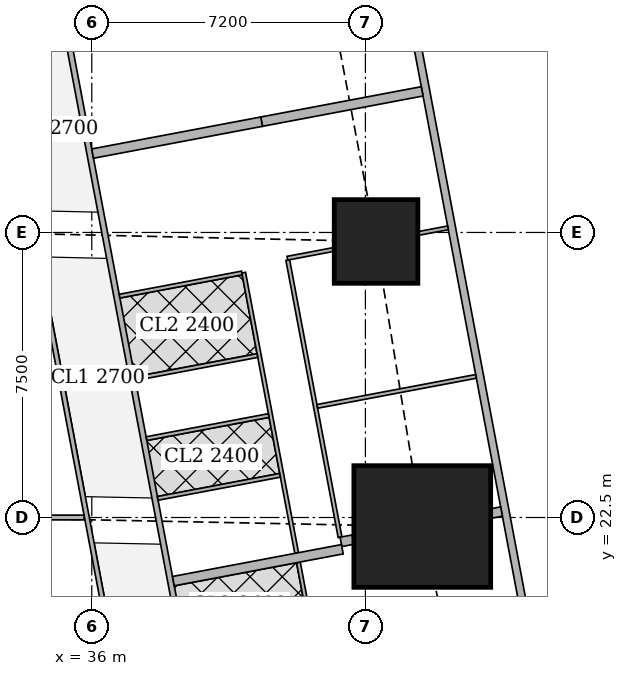
"""IFC4 building model, lengths in metres.
Left out: names, types, materials, properties, quantities, classifications, styles, units other than length and angle.
Written with IfcOpenShell. Run it as: python <this file> out.ifc"""

import sys

from ifc_helpers import new_model, si_unit, direction, frame, frame_2d, origin, origin_2d, place, context, subcontext, project, spatial, rectangle, extrude, element, fill, save


model = new_model("IFC4")
c1 = context("Model", 3, precision=1e-05, world=origin(), true_north=direction((0.0, 1.0)))
c2 = subcontext(c1, "Body", "Model", "MODEL_VIEW")
j1 = project(units=[si_unit("LENGTHUNIT", "METRE"), si_unit("PLANEANGLEUNIT", "RADIAN")], contexts=[c1])
p1 = place(None, origin())
s1 = spatial("IfcSite", under=j1, at=p1, CompositionType="ELEMENT")
p2 = place(p1, origin())
s2 = spatial("IfcBuilding", under=s1, at=p2, CompositionType="ELEMENT")
p3 = place(p2, frame((0.0, 0.0, 100.4)))
s3 = spatial("IfcBuildingStorey", under=s2, at=p3, CompositionType="ELEMENT", Elevation=100.4)
p4 = place(p3, frame((44.697, 22.263, 0.0), z_axis=(0.0, 0.0, 1.0), x_axis=(1.0, 0.0, 0.0)))
e1 = element("IfcColumn", 1, at=p4, inside=s3, PredefinedType="COLUMN", context=c2, shape_type="SweptSolid", body=[
    extrude(rectangle(XDim=3.6, YDim=3.2, at=origin_2d()), origin(), (0.0, 0.0, 1.0), 3.75),
])
p5 = place(p3, frame((43.48, 29.763, 0.0), z_axis=(0.0, 0.0, 1.0), x_axis=(1.0, 0.0, 0.0)))
e2 = element("IfcColumn", 2, at=p5, inside=s3, PredefinedType="COLUMN", context=c2, shape_type="SweptSolid", body=[
    extrude(rectangle(XDim=2.2, YDim=2.2, at=origin_2d()), origin(), (0.0, 0.0, 1.0), 3.75),
])
p6 = place(p3, frame((50.653, 2.703, 0.0), z_axis=(0.0, 0.0, 1.0), x_axis=(-0.185612026696, 0.982623109613, 0.0)))
e3 = element("IfcWall", 3, at=p6, inside=s3, PredefinedType="SOLIDWALL", context=c2, shape_type="SweptSolid", body=[
    extrude(rectangle(XDim=41.393, YDim=0.2, at=frame_2d((20.697, 0.0))), origin(), (0.0, 0.0, 1.0), 3.5),
])
p7 = place(p6, frame((1.633, 0.0, 0.9)))
e4 = element("IfcOpeningElement", 4, at=p7, cuts=e3, PredefinedType="OPENING", context=c2, shape_type="SweptSolid", body=[
    extrude(rectangle(XDim=1.8, YDim=1.5, at=frame_2d((0.9, 0.75))), frame((0.0, 0.11, 0.0), z_axis=(0.0, -1.0, 0.0), x_axis=(1.0, 0.0, 0.0)), (0.0, 0.0, 1.0), 0.22),
])
p8 = place(p6, frame((6.032, 0.0, 0.9)))
e5 = element("IfcOpeningElement", 5, at=p8, cuts=e3, PredefinedType="OPENING", context=c2, shape_type="SweptSolid", body=[
    extrude(rectangle(XDim=1.8, YDim=1.5, at=frame_2d((0.9, 0.75))), frame((0.0, 0.11, 0.0), z_axis=(0.0, -1.0, 0.0), x_axis=(1.0, 0.0, 0.0)), (0.0, 0.0, 1.0), 0.22),
])
p9 = place(p6, frame((9.848, 0.0, 0.9)))
e6 = element("IfcOpeningElement", 6, at=p9, cuts=e3, PredefinedType="OPENING", context=c2, shape_type="SweptSolid", body=[
    extrude(rectangle(XDim=1.8, YDim=1.5, at=frame_2d((0.9, 0.75))), frame((0.0, 0.11, 0.0), z_axis=(0.0, -1.0, 0.0), x_axis=(1.0, 0.0, 0.0)), (0.0, 0.0, 1.0), 0.22),
])
p10 = place(p6, frame((13.664, 0.0, 0.9)))
e7 = element("IfcOpeningElement", 7, at=p10, cuts=e3, PredefinedType="OPENING", context=c2, shape_type="SweptSolid", body=[
    extrude(rectangle(XDim=1.8, YDim=1.5, at=frame_2d((0.9, 0.75))), frame((0.0, 0.11, 0.0), z_axis=(0.0, -1.0, 0.0), x_axis=(1.0, 0.0, 0.0)), (0.0, 0.0, 1.0), 0.22),
])
p11 = place(p6, frame((17.481, 0.0, 0.9)))
e8 = element("IfcOpeningElement", 8, at=p11, cuts=e3, PredefinedType="OPENING", context=c2, shape_type="SweptSolid", body=[
    extrude(rectangle(XDim=1.8, YDim=1.5, at=frame_2d((0.9, 0.75))), frame((0.0, 0.11, 0.0), z_axis=(0.0, -1.0, 0.0), x_axis=(1.0, 0.0, 0.0)), (0.0, 0.0, 1.0), 0.22),
])
p12 = place(p6, frame((21.297, 0.0, 0.9)))
e9 = element("IfcOpeningElement", 9, at=p12, cuts=e3, PredefinedType="OPENING", context=c2, shape_type="SweptSolid", body=[
    extrude(rectangle(XDim=1.8, YDim=1.5, at=frame_2d((0.9, 0.75))), frame((0.0, 0.11, 0.0), z_axis=(0.0, -1.0, 0.0), x_axis=(1.0, 0.0, 0.0)), (0.0, 0.0, 1.0), 0.22),
])
p13 = place(p6, frame((25.113, 0.0, 0.9)))
e10 = element("IfcOpeningElement", 10, at=p13, cuts=e3, PredefinedType="OPENING", context=c2, shape_type="SweptSolid", body=[
    extrude(rectangle(XDim=1.8, YDim=1.5, at=frame_2d((0.9, 0.75))), frame((0.0, 0.11, 0.0), z_axis=(0.0, -1.0, 0.0), x_axis=(1.0, 0.0, 0.0)), (0.0, 0.0, 1.0), 0.22),
])
p14 = place(p6, frame((28.93, 0.0, 0.9)))
e11 = element("IfcOpeningElement", 11, at=p14, cuts=e3, PredefinedType="OPENING", context=c2, shape_type="SweptSolid", body=[
    extrude(rectangle(XDim=1.8, YDim=1.5, at=frame_2d((0.9, 0.75))), frame((0.0, 0.11, 0.0), z_axis=(0.0, -1.0, 0.0), x_axis=(1.0, 0.0, 0.0)), (0.0, 0.0, 1.0), 0.22),
])
p15 = place(p6, frame((32.746, 0.0, 0.9)))
e12 = element("IfcOpeningElement", 12, at=p15, cuts=e3, PredefinedType="OPENING", context=c2, shape_type="SweptSolid", body=[
    extrude(rectangle(XDim=1.8, YDim=1.5, at=frame_2d((0.9, 0.75))), frame((0.0, 0.11, 0.0), z_axis=(0.0, -1.0, 0.0), x_axis=(1.0, 0.0, 0.0)), (0.0, 0.0, 1.0), 0.22),
])
p16 = place(p6, frame((36.481, 0.0, 0.9)))
e13 = element("IfcOpeningElement", 13, at=p16, cuts=e3, PredefinedType="OPENING", context=c2, shape_type="SweptSolid", body=[
    extrude(rectangle(XDim=1.8, YDim=1.5, at=frame_2d((0.9, 0.75))), frame((0.0, 0.11, 0.0), z_axis=(0.0, -1.0, 0.0), x_axis=(1.0, 0.0, 0.0)), (0.0, 0.0, 1.0), 0.22),
])
p17 = place(p3, frame((33.382, 45.65, 0.0), z_axis=(0.0, 0.0, 1.0), x_axis=(0.185593544777, -0.982626600565, 0.0)))
e14 = element("IfcWall", 14, at=p17, inside=s3, PredefinedType="SOLIDWALL", context=c2, shape_type="SweptSolid", body=[
    extrude(rectangle(XDim=47.118, YDim=0.15, at=frame_2d((23.559, 0.0))), origin(), (0.0, 0.0, 1.0), 2.2),
])
p18 = place(p17, frame((10.662, 0.0, 0.0)))
e15 = element("IfcOpeningElement", 15, at=p18, cuts=e14, PredefinedType="OPENING", context=c2, shape_type="SweptSolid", body=[
    extrude(rectangle(XDim=1.0, YDim=2.1, at=frame_2d((0.5, 1.05))), frame((0.0, 0.085, 0.0), z_axis=(0.0, -1.0, 0.0), x_axis=(1.0, 0.0, 0.0)), (0.0, 0.0, 1.0), 0.17),
])
p19 = place(p17, frame((15.237, 0.0, 0.0)))
e16 = element("IfcOpeningElement", 16, at=p19, cuts=e14, PredefinedType="OPENING", context=c2, shape_type="SweptSolid", body=[
    extrude(rectangle(XDim=1.0, YDim=2.1, at=frame_2d((0.5, 1.05))), frame((0.0, 0.085, 0.0), z_axis=(0.0, -1.0, 0.0), x_axis=(1.0, 0.0, 0.0)), (0.0, 0.0, 1.0), 0.17),
])
p20 = place(p17, frame((27.341, 0.0, 0.0)))
e17 = element("IfcOpeningElement", 17, at=p20, cuts=e14, PredefinedType="OPENING", context=c2, shape_type="SweptSolid", body=[
    extrude(rectangle(XDim=1.0, YDim=2.1, at=frame_2d((0.5, 1.05))), frame((0.0, 0.085, 0.0), z_axis=(0.0, -1.0, 0.0), x_axis=(1.0, 0.0, 0.0)), (0.0, 0.0, 1.0), 0.17),
])
p21 = place(p17, frame((33.833, 0.0, 0.0)))
e18 = element("IfcOpeningElement", 18, at=p21, cuts=e14, PredefinedType="OPENING", context=c2, shape_type="SweptSolid", body=[
    extrude(rectangle(XDim=1.0, YDim=2.1, at=frame_2d((0.5, 1.05))), frame((0.0, 0.085, 0.0), z_axis=(0.0, -1.0, 0.0), x_axis=(1.0, 0.0, 0.0)), (0.0, 0.0, 1.0), 0.17),
])
p22 = place(p3, frame((41.157, 29.273, 0.0), z_axis=(0.0, 0.0, 1.0), x_axis=(0.18542464283, -0.982658486877, 0.0)))
e19 = element("IfcWall", 19, at=p22, inside=s3, PredefinedType="PARTITIONING", context=c2, shape_type="SweptSolid", body=[
    extrude(rectangle(XDim=7.421, YDim=0.1, at=frame_2d((3.71, 0.0))), origin(), (0.0, 0.0, 1.0), 2.5),
])
p23 = place(p22, frame((0.9, 0.0, 0.0)))
e20 = element("IfcOpeningElement", 20, at=p23, cuts=e19, PredefinedType="OPENING", context=c2, shape_type="SweptSolid", body=[
    extrude(rectangle(XDim=0.9, YDim=2.1, at=frame_2d((0.45, 1.05))), frame((0.0, 0.06, 0.0), z_axis=(0.0, -1.0, 0.0), x_axis=(1.0, 0.0, 0.0)), (0.0, 0.0, 1.0), 0.12),
])
p24 = place(p22, frame((4.126, 0.0, 0.0)))
e21 = element("IfcOpeningElement", 21, at=p24, cuts=e19, PredefinedType="OPENING", context=c2, shape_type="SweptSolid", body=[
    extrude(rectangle(XDim=0.9, YDim=2.1, at=frame_2d((0.45, 1.05))), frame((0.0, 0.06, 0.0), z_axis=(0.0, -1.0, 0.0), x_axis=(1.0, 0.0, 0.0)), (0.0, 0.0, 1.0), 0.12),
])
p25 = place(p3, frame((39.997, 28.942, 0.0), z_axis=(0.0, 0.0, 1.0), x_axis=(0.185686318797, -0.982609073341, 0.0)))
e22 = element("IfcWall", 22, at=p25, inside=s3, PredefinedType="PARTITIONING", context=c2, shape_type="SweptSolid", body=[
    extrude(rectangle(XDim=7.508, YDim=0.1, at=frame_2d((3.754, 0.0))), origin(), (0.0, 0.0, 1.0), 2.5),
])
p26 = place(p25, frame((0.655, 0.0, 0.0)))
e23 = element("IfcOpeningElement", 23, at=p26, cuts=e22, PredefinedType="OPENING", context=c2, shape_type="SweptSolid", body=[
    extrude(rectangle(XDim=0.9, YDim=2.1, at=frame_2d((0.45, 1.05))), frame((0.0, 0.06, 0.0), z_axis=(0.0, -1.0, 0.0), x_axis=(1.0, 0.0, 0.0)), (0.0, 0.0, 1.0), 0.12),
])
p27 = place(p25, frame((4.166, 0.0, 0.0)))
e24 = element("IfcOpeningElement", 24, at=p27, cuts=e22, PredefinedType="OPENING", context=c2, shape_type="SweptSolid", body=[
    extrude(rectangle(XDim=0.9, YDim=2.1, at=frame_2d((0.45, 1.05))), frame((0.0, 0.06, 0.0), z_axis=(0.0, -1.0, 0.0), x_axis=(1.0, 0.0, 0.0)), (0.0, 0.0, 1.0), 0.12),
])
p28 = place(p25, frame((2.563, 0.0, 0.0)))
e25 = element("IfcOpeningElement", 25, at=p28, cuts=e22, PredefinedType="OPENING", context=c2, shape_type="SweptSolid", body=[
    extrude(rectangle(XDim=0.9, YDim=2.1, at=frame_2d((0.45, 1.05))), frame((0.0, 0.06, 0.0), z_axis=(0.0, -1.0, 0.0), x_axis=(1.0, 0.0, 0.0)), (0.0, 0.0, 1.0), 0.12),
])
p29 = place(p25, frame((6.074, 0.0, 0.0)))
e26 = element("IfcOpeningElement", 26, at=p29, cuts=e22, PredefinedType="OPENING", context=c2, shape_type="SweptSolid", body=[
    extrude(rectangle(XDim=0.9, YDim=2.1, at=frame_2d((0.45, 1.05))), frame((0.0, 0.06, 0.0), z_axis=(0.0, -1.0, 0.0), x_axis=(1.0, 0.0, 0.0)), (0.0, 0.0, 1.0), 0.12),
])
p30 = place(p3, frame((45.372, 30.121, 0.0), z_axis=(0.0, 0.0, 1.0), x_axis=(-0.982512656401, -0.186195810938, 0.0)))
e27 = element("IfcWall", 27, at=p30, inside=s3, PredefinedType="PARTITIONING", context=c2, shape_type="SweptSolid", body=[
    extrude(rectangle(XDim=0.796, YDim=0.1, at=frame_2d((0.398, 0.0))), origin(), (0.0, 0.0, 1.0), 3.5),
])
p31 = place(p3, frame((42.37, 29.553, 0.0), z_axis=(0.0, 0.0, 1.0), x_axis=(-0.98263602344, -0.185543648338, 0.0)))
e28 = element("IfcWall", 28, at=p31, inside=s3, PredefinedType="PARTITIONING", context=c2, shape_type="SweptSolid", body=[
    extrude(rectangle(XDim=1.245, YDim=0.1, at=frame_2d((0.623, 0.0))), origin(), (0.0, 0.0, 1.0), 2.5),
])
p32 = place(p3, frame((46.11, 26.213, 0.0), z_axis=(0.0, 0.0, 1.0), x_axis=(-0.982623519589, -0.185609856287, 0.0)))
e29 = element("IfcWall", 29, at=p32, inside=s3, PredefinedType="PARTITIONING", context=c2, shape_type="SweptSolid", body=[
    extrude(rectangle(XDim=4.25, YDim=0.1, at=frame_2d((2.125, 0.0))), origin(), (0.0, 0.0, 1.0), 2.2),
])
p33 = place(p3, frame((39.948, 28.933, 0.0), z_axis=(0.0, 0.0, 1.0), x_axis=(-0.982542259571, -0.186039533857, 0.0)))
e30 = element("IfcWall", 30, at=p33, inside=s3, PredefinedType="PARTITIONING", context=c2, shape_type="SweptSolid", body=[
    extrude(rectangle(XDim=3.274, YDim=0.1, at=frame_2d((1.637, 0.0))), origin(), (0.0, 0.0, 1.0), 3.5),
])
p34 = place(p3, frame((40.656, 25.183, 0.0), z_axis=(0.0, 0.0, 1.0), x_axis=(-0.982596739811, -0.18575157311, 0.0)))
e31 = element("IfcWall", 31, at=p34, inside=s3, PredefinedType="PARTITIONING", context=c2, shape_type="SweptSolid", body=[
    extrude(rectangle(XDim=3.274, YDim=0.1, at=frame_2d((1.637, 0.0))), origin(), (0.0, 0.0, 1.0), 3.5),
])
p35 = place(p3, frame((40.358, 26.761, 0.0), z_axis=(0.0, 0.0, 1.0), x_axis=(-0.982607776398, -0.185693181787, 0.0)))
e32 = element("IfcWall", 32, at=p35, inside=s3, PredefinedType="PARTITIONING", context=c2, shape_type="SweptSolid", body=[
    extrude(rectangle(XDim=3.274, YDim=0.1, at=frame_2d((1.637, 0.0))), origin(), (0.0, 0.0, 1.0), 3.5),
])
p36 = place(p3, frame((40.954, 23.61, 0.0), z_axis=(0.0, 0.0, 1.0), x_axis=(-0.982661397469, -0.185409217473, 0.0)))
e33 = element("IfcWall", 33, at=p36, inside=s3, PredefinedType="PARTITIONING", context=c2, shape_type="SweptSolid", body=[
    extrude(rectangle(XDim=3.275, YDim=0.1, at=frame_2d((1.637, 0.0))), origin(), (0.0, 0.0, 1.0), 2.5),
])
p37 = place(p3, frame((44.693, 33.713, 0.0), z_axis=(0.0, 0.0, 1.0), x_axis=(-0.982633535512, -0.185556823879, 0.0)))
e34 = element("IfcWall", 34, at=p37, inside=s3, PredefinedType="SOLIDWALL", context=c2, shape_type="SweptSolid", body=[
    extrude(rectangle(XDim=4.3, YDim=0.25, at=frame_2d((2.15, 0.0))), origin(), (0.0, 0.0, 1.0), 2.2),
])
p38 = place(p3, frame((40.468, 32.915, 0.0), z_axis=(0.0, 0.0, 1.0), x_axis=(-0.982612837616, -0.185666398014, 0.0)))
e35 = element("IfcWall", 35, at=p38, inside=s3, PredefinedType="SOLIDWALL", context=c2, shape_type="SweptSolid", body=[
    extrude(rectangle(XDim=4.525, YDim=0.25, at=frame_2d((2.262, 0.0))), origin(), (0.0, 0.0, 1.0), 3.5),
])
p39 = place(p3, frame((41.437, 21.319, 0.0), z_axis=(0.0, 0.0, 1.0), x_axis=(0.185793689589, -0.982588777113, 0.0)))
e36 = element("IfcWall", 36, at=p39, inside=s3, PredefinedType="PARTITIONING", context=c2, shape_type="SweptSolid", body=[
    extrude(rectangle(XDim=1.625, YDim=0.1, at=frame_2d((0.813, 0.0))), origin(), (0.0, 0.0, 1.0), 3.5),
])
p40 = place(p39, frame((0.325, 0.0, 0.0)))
e37 = element("IfcOpeningElement", 37, at=p40, cuts=e36, PredefinedType="OPENING", context=c2, shape_type="SweptSolid", body=[
    extrude(rectangle(XDim=0.9, YDim=2.1, at=frame_2d((0.45, 1.05))), frame((0.0, 0.06, 0.0), z_axis=(0.0, -1.0, 0.0), x_axis=(1.0, 0.0, 0.0)), (0.0, 0.0, 1.0), 0.12),
])
p41 = place(p3, frame((46.782, 22.657, 0.0), z_axis=(0.0, 0.0, 1.0), x_axis=(-0.982104607121, -0.188336243648, 0.0)))
e38 = element("IfcWall", 38, at=p41, inside=s3, PredefinedType="SOLIDWALL", context=c2, shape_type="SweptSolid", body=[
    extrude(rectangle(XDim=0.266, YDim=0.25, at=frame_2d((0.133, 0.0))), origin(), (0.0, 0.0, 1.0), 3.5),
])
p42 = place(p3, frame((42.873, 21.918, 0.0), z_axis=(0.0, 0.0, 1.0), x_axis=(-0.982431406936, -0.186624035603, 0.0)))
e39 = element("IfcWall", 39, at=p42, inside=s3, PredefinedType="SOLIDWALL", context=c2, shape_type="SweptSolid", body=[
    extrude(rectangle(XDim=0.322, YDim=0.25, at=frame_2d((0.161, 0.0))), origin(), (0.0, 0.0, 1.0), 2.5),
])
p43 = place(p3, frame((42.593, 21.665, 0.0), z_axis=(0.0, 0.0, 1.0), x_axis=(-0.982612837616, -0.185666398014, 0.0)))
e40 = element("IfcWall", 40, at=p43, inside=s3, PredefinedType="SOLIDWALL", context=c2, shape_type="SweptSolid", body=[
    extrude(rectangle(XDim=4.525, YDim=0.25, at=frame_2d((2.262, 0.0))), origin(), (0.0, 0.0, 1.0), 2.5),
])
p44 = place(p3, frame((38.202, 10.163, 0.0), z_axis=(0.0, 0.0, 1.0), x_axis=(-0.185610321132, 0.982623431783, 0.0)))
e41 = element("IfcWall", 41, at=p44, inside=s3, PredefinedType="PARTITIONING", context=c2, shape_type="SweptSolid", body=[
    extrude(rectangle(XDim=25.111, YDim=0.125, at=frame_2d((12.556, 0.0))), origin(), (0.0, 0.0, 1.0), 2.5),
])
p45 = place(p44, frame((0.708, 0.0, 0.0)))
e42 = element("IfcOpeningElement", 42, at=p45, cuts=e41, PredefinedType="OPENING", context=c2, shape_type="SweptSolid", body=[
    extrude(rectangle(XDim=1.0, YDim=2.1, at=frame_2d((0.5, 1.05))), frame((0.0, 0.073, 0.0), z_axis=(0.0, -1.0, 0.0), x_axis=(1.0, 0.0, 0.0)), (0.0, 0.0, 1.0), 0.145),
])
p46 = place(p44, frame((6.0, 0.0, 0.0)))
e43 = element("IfcOpeningElement", 43, at=p46, cuts=e41, PredefinedType="OPENING", context=c2, shape_type="SweptSolid", body=[
    extrude(rectangle(XDim=1.0, YDim=2.1, at=frame_2d((0.5, 1.05))), frame((0.0, 0.073, 0.0), z_axis=(0.0, -1.0, 0.0), x_axis=(1.0, 0.0, 0.0)), (0.0, 0.0, 1.0), 0.145),
])
p47 = place(p44, frame((13.378, 0.0, 0.0)))
e44 = element("IfcOpeningElement", 44, at=p47, cuts=e41, PredefinedType="OPENING", context=c2, shape_type="SweptSolid", body=[
    extrude(rectangle(XDim=1.0, YDim=2.1, at=frame_2d((0.5, 1.05))), frame((0.0, 0.073, 0.0), z_axis=(0.0, -1.0, 0.0), x_axis=(1.0, 0.0, 0.0)), (0.0, 0.0, 1.0), 0.145),
])
p48 = place(p44, frame((21.25, 0.0, 0.0)))
e45 = element("IfcOpeningElement", 45, at=p48, cuts=e41, PredefinedType="OPENING", context=c2, shape_type="SweptSolid", body=[
    extrude(rectangle(XDim=1.0, YDim=2.1, at=frame_2d((0.5, 1.05))), frame((0.0, 0.073, 0.0), z_axis=(0.0, -1.0, 0.0), x_axis=(1.0, 0.0, 0.0)), (0.0, 0.0, 1.0), 0.145),
])
p49 = place(p3, frame((33.801, 22.5, 0.0), z_axis=(0.0, 0.0, 1.0), x_axis=(1.0, 0.0, 0.0)))
e46 = element("IfcWall", 46, at=p49, inside=s3, PredefinedType="PARTITIONING", context=c2, shape_type="SweptSolid", body=[
    extrude(rectangle(XDim=1.995, YDim=0.125, at=frame_2d((0.998, 0.0))), origin(), (0.0, 0.0, 1.0), 2.5),
])
p50 = place(p11, origin())
e47 = element("IfcWindow", 47, at=p50, inside=s3, PartitioningType="SINGLE_PANEL", PredefinedType="WINDOW", context=c2, shape_type="SweptSolid", body=[
    extrude(rectangle(XDim=1.8, YDim=1.5, at=frame_2d((0.9, 0.75))), frame((0.0, 0.03, 0.0), z_axis=(0.0, -1.0, 0.0), x_axis=(1.0, 0.0, 0.0)), (0.0, 0.0, 1.0), 0.06),
])
fill(e8, e47)
p51 = place(p12, origin())
e48 = element("IfcWindow", 48, at=p51, inside=s3, PartitioningType="SINGLE_PANEL", PredefinedType="WINDOW", context=c2, shape_type="SweptSolid", body=[
    extrude(rectangle(XDim=1.8, YDim=1.5, at=frame_2d((0.9, 0.75))), frame((0.0, 0.03, 0.0), z_axis=(0.0, -1.0, 0.0), x_axis=(1.0, 0.0, 0.0)), (0.0, 0.0, 1.0), 0.06),
])
fill(e9, e48)
p52 = place(p13, origin())
e49 = element("IfcWindow", 49, at=p52, inside=s3, PartitioningType="SINGLE_PANEL", PredefinedType="WINDOW", context=c2, shape_type="SweptSolid", body=[
    extrude(rectangle(XDim=1.8, YDim=1.5, at=frame_2d((0.9, 0.75))), frame((0.0, 0.03, 0.0), z_axis=(0.0, -1.0, 0.0), x_axis=(1.0, 0.0, 0.0)), (0.0, 0.0, 1.0), 0.06),
])
fill(e10, e49)
p53 = place(p14, origin())
e50 = element("IfcWindow", 50, at=p53, inside=s3, PartitioningType="SINGLE_PANEL", PredefinedType="WINDOW", context=c2, shape_type="SweptSolid", body=[
    extrude(rectangle(XDim=1.8, YDim=1.5, at=frame_2d((0.9, 0.75))), frame((0.0, 0.03, 0.0), z_axis=(0.0, -1.0, 0.0), x_axis=(1.0, 0.0, 0.0)), (0.0, 0.0, 1.0), 0.06),
])
fill(e11, e50)
p54 = place(p18, origin())
e51 = element("IfcDoor", 51, at=p54, inside=s3, OperationType="SINGLE_SWING_RIGHT", PredefinedType="DOOR", context=c2, shape_type="SweptSolid", body=[
    extrude(rectangle(XDim=1.0, YDim=2.1, at=frame_2d((0.5, 1.05))), frame((0.0, 0.025, 0.0), z_axis=(0.0, -1.0, 0.0), x_axis=(1.0, 0.0, 0.0)), (0.0, 0.0, 1.0), 0.05),
])
fill(e15, e51)
p55 = place(p23, origin())
e52 = element("IfcDoor", 52, at=p55, inside=s3, OperationType="SINGLE_SWING_LEFT", PredefinedType="DOOR", context=c2, shape_type="SweptSolid", body=[
    extrude(rectangle(XDim=0.9, YDim=2.1, at=frame_2d((0.45, 1.05))), frame((0.0, 0.025, 0.0), z_axis=(0.0, -1.0, 0.0), x_axis=(1.0, 0.0, 0.0)), (0.0, 0.0, 1.0), 0.05),
])
fill(e20, e52)
p56 = place(p24, origin())
e53 = element("IfcDoor", 53, at=p56, inside=s3, OperationType="SINGLE_SWING_LEFT", PredefinedType="DOOR", context=c2, shape_type="SweptSolid", body=[
    extrude(rectangle(XDim=0.9, YDim=2.1, at=frame_2d((0.45, 1.05))), frame((0.0, 0.025, 0.0), z_axis=(0.0, -1.0, 0.0), x_axis=(1.0, 0.0, 0.0)), (0.0, 0.0, 1.0), 0.05),
])
fill(e21, e53)
p57 = place(p26, origin())
e54 = element("IfcDoor", 54, at=p57, inside=s3, OperationType="SINGLE_SWING_RIGHT", PredefinedType="DOOR", context=c2, shape_type="SweptSolid", body=[
    extrude(rectangle(XDim=0.9, YDim=2.1, at=frame_2d((0.45, 1.05))), frame((0.0, 0.025, 0.0), z_axis=(0.0, -1.0, 0.0), x_axis=(1.0, 0.0, 0.0)), (0.0, 0.0, 1.0), 0.05),
])
fill(e23, e54)
p58 = place(p27, origin())
e55 = element("IfcDoor", 55, at=p58, inside=s3, OperationType="SINGLE_SWING_RIGHT", PredefinedType="DOOR", context=c2, shape_type="SweptSolid", body=[
    extrude(rectangle(XDim=0.9, YDim=2.1, at=frame_2d((0.45, 1.05))), frame((0.0, 0.025, 0.0), z_axis=(0.0, -1.0, 0.0), x_axis=(1.0, 0.0, 0.0)), (0.0, 0.0, 1.0), 0.05),
])
fill(e24, e55)
p59 = place(p28, origin())
e56 = element("IfcDoor", 56, at=p59, inside=s3, OperationType="SINGLE_SWING_RIGHT", PredefinedType="DOOR", context=c2, shape_type="SweptSolid", body=[
    extrude(rectangle(XDim=0.9, YDim=2.1, at=frame_2d((0.45, 1.05))), frame((0.0, 0.025, 0.0), z_axis=(0.0, -1.0, 0.0), x_axis=(1.0, 0.0, 0.0)), (0.0, 0.0, 1.0), 0.05),
])
fill(e25, e56)
p60 = place(p29, origin())
e57 = element("IfcDoor", 57, at=p60, inside=s3, OperationType="SINGLE_SWING_LEFT", PredefinedType="DOOR", context=c2, shape_type="SweptSolid", body=[
    extrude(rectangle(XDim=0.9, YDim=2.1, at=frame_2d((0.45, 1.05))), frame((0.0, 0.025, 0.0), z_axis=(0.0, -1.0, 0.0), x_axis=(1.0, 0.0, 0.0)), (0.0, 0.0, 1.0), 0.05),
])
fill(e26, e57)
p61 = place(p19, origin())
e58 = element("IfcDoor", 58, at=p61, inside=s3, OperationType="SINGLE_SWING_LEFT", PredefinedType="DOOR", context=c2, shape_type="SweptSolid", body=[
    extrude(rectangle(XDim=1.0, YDim=2.1, at=frame_2d((0.5, 1.05))), frame((0.0, 0.025, 0.0), z_axis=(0.0, -1.0, 0.0), x_axis=(1.0, 0.0, 0.0)), (0.0, 0.0, 1.0), 0.05),
])
fill(e16, e58)
p62 = place(p40, origin())
e59 = element("IfcDoor", 59, at=p62, inside=s3, OperationType="SINGLE_SWING_RIGHT", PredefinedType="DOOR", context=c2, shape_type="SweptSolid", body=[
    extrude(rectangle(XDim=0.9, YDim=2.1, at=frame_2d((0.45, 1.05))), frame((0.0, 0.025, 0.0), z_axis=(0.0, -1.0, 0.0), x_axis=(1.0, 0.0, 0.0)), (0.0, 0.0, 1.0), 0.05),
])
fill(e37, e59)
p63 = place(p47, origin())
e60 = element("IfcDoor", 60, at=p63, inside=s3, OperationType="SINGLE_SWING_LEFT", PredefinedType="DOOR", context=c2, shape_type="SweptSolid", body=[
    extrude(rectangle(XDim=1.0, YDim=2.1, at=frame_2d((0.5, 1.05))), frame((0.0, 0.025, 0.0), z_axis=(0.0, -1.0, 0.0), x_axis=(1.0, 0.0, 0.0)), (0.0, 0.0, 1.0), 0.05),
])
fill(e44, e60)
save(model, sys.argv[1])
